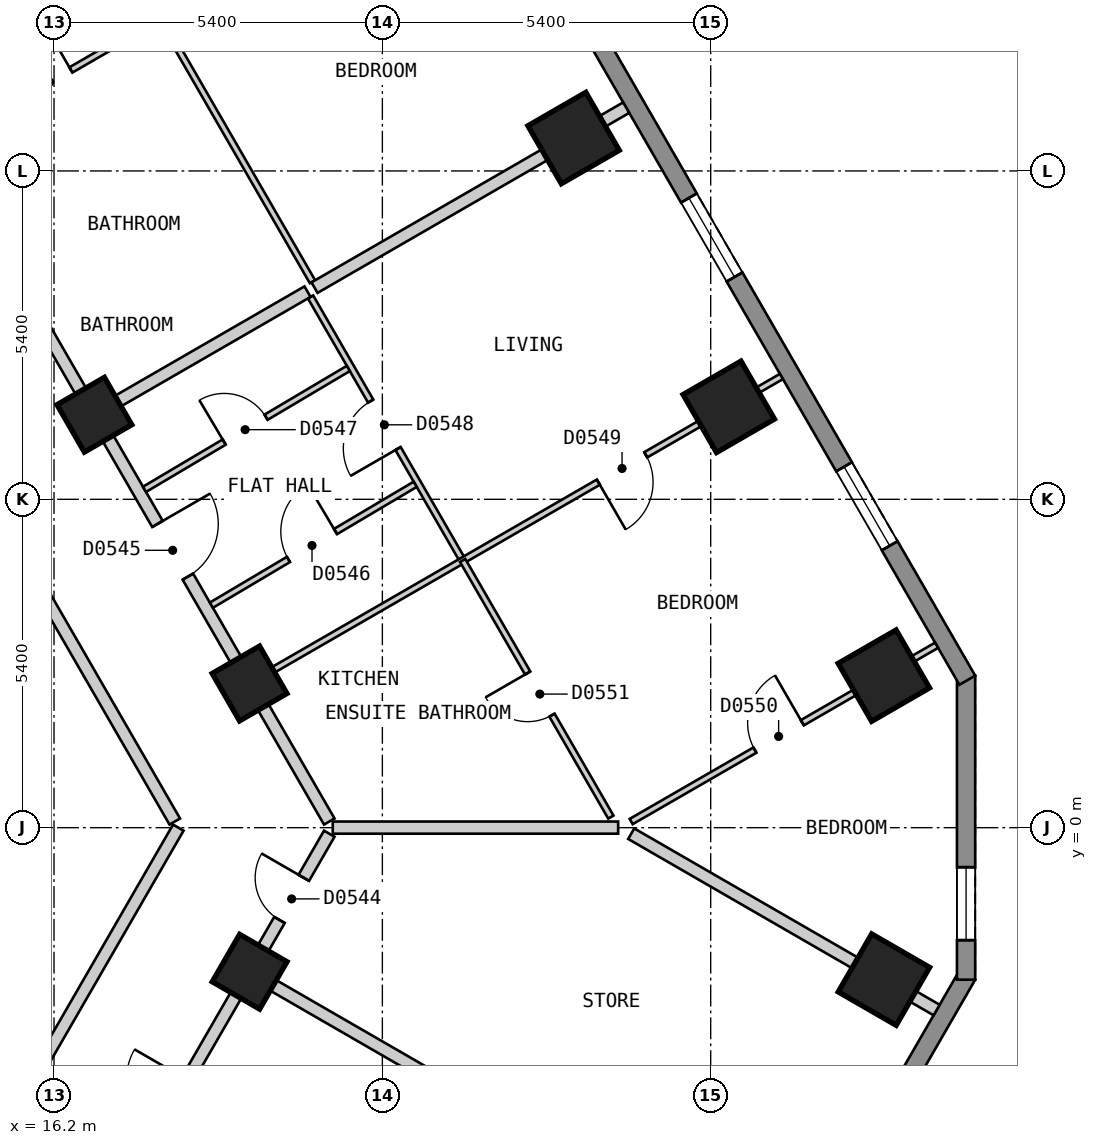
"""IFC4 building model, lengths in metres.
Left out: names, types, materials, properties, quantities, classifications, styles, units other than length and angle.
Written with IfcOpenShell. Run it as: python <this file> out.ifc"""

import sys

from ifc_helpers import new_model, si_unit, direction, frame, frame_2d, origin, origin_2d, place, context, subcontext, project, spatial, polyline, rectangle, outline, extrude, element, fill, save


model = new_model("IFC4")
c1 = context("Model", 3, precision=1e-05, world=origin(), true_north=direction((0.0, 1.0)))
c2 = subcontext(c1, "Body", "Model", "MODEL_VIEW")
j1 = project(units=[si_unit("LENGTHUNIT", "METRE"), si_unit("PLANEANGLEUNIT", "RADIAN")], contexts=[c1])
p1 = place(None, origin())
s1 = spatial("IfcSite", under=j1, at=p1, CompositionType="ELEMENT")
p2 = place(p1, origin())
s2 = spatial("IfcBuilding", under=s1, at=p2, CompositionType="ELEMENT")
p3 = place(p2, frame((0.0, 0.0, 56.4)))
s3 = spatial("IfcBuildingStorey", under=s2, at=p3, CompositionType="ELEMENT", Elevation=56.4)
for number, where, z_axis, x_axis in (
    (1, (29.849, -2.499, 0.0), (0.0, 0.0, 1.0), (0.5, 0.866, 0.0)),
    (2, (29.848, 2.5, 0.0), (0.0, 0.0, 1.0), (-0.5, 0.866, 0.0)),
    (3, (27.297, 6.921, 0.0), (0.0, 0.0, 1.0), (-0.5, 0.866, 0.0)),
    (4, (24.745, 11.341, 0.0), (0.0, 0.0, 1.0), (-0.5, 0.866, 0.0)),
):
    element("IfcColumn", number, at=place(p3, frame(where, z_axis=z_axis, x_axis=x_axis)), inside=s3, PredefinedType="COLUMN", context=c2, shape_type="SweptSolid", body=[
        extrude(rectangle(XDim=1.1, YDim=1.1, at=origin_2d()), origin(), (0.0, 0.0, 1.0), 3.0),
    ])
for number, where, z_axis, x_axis in (
    (5, (19.417, -2.369, 0.0), (0.0, 0.0, 1.0), (0.5, 0.866, 0.0)),
    (6, (19.416, 2.371, 0.0), (0.0, 0.0, 1.0), (-0.5, 0.866, 0.0)),
    (7, (16.864, 6.791, 0.0), (0.0, 0.0, 1.0), (-0.5, 0.866, 0.0)),
):
    element("IfcColumn", number, at=place(p3, frame(where, z_axis=z_axis, x_axis=x_axis)), inside=s3, PredefinedType="COLUMN", context=c2, shape_type="SweptSolid", body=[
        extrude(rectangle(XDim=0.9, YDim=0.9, at=origin_2d()), origin(), (0.0, 0.0, 1.0), 3.0),
    ])
p4 = place(p3, frame((17.71, -25.825, 0.0), z_axis=(0.0, 0.0, 1.0), x_axis=(0.500001938803, 0.866024284413, 0.0)))
e8 = element("IfcWall", 8, at=p4, inside=s3, PredefinedType="SOLIDWALL", context=c2, shape_type="SweptSolid", body=[
    extrude(outline(polyline([(0.0, -0.15), (27.02, -0.15), (26.94, 0.15), (0.08, 0.15), (0.0, -0.15)])), origin(), (0.0, 0.0, 1.0), 2.7),
])
p5 = place(p4, frame((2.553, 0.0, 0.15)))
e9 = element("IfcOpeningElement", 9, at=p5, cuts=e8, PredefinedType="OPENING", context=c2, shape_type="SweptSolid", body=[
    extrude(rectangle(XDim=1.5, YDim=2.1, at=frame_2d((0.75, 1.05))), frame((0.0, 0.16, 0.0), z_axis=(0.0, -1.0, 0.0), x_axis=(1.0, 0.0, 0.0)), (0.0, 0.0, 1.0), 0.32),
])
p6 = place(p4, frame((7.658, 0.0, 0.15)))
e10 = element("IfcOpeningElement", 10, at=p6, cuts=e8, PredefinedType="OPENING", context=c2, shape_type="SweptSolid", body=[
    extrude(rectangle(XDim=1.5, YDim=2.1, at=frame_2d((0.75, 1.05))), frame((0.0, 0.16, 0.0), z_axis=(0.0, -1.0, 0.0), x_axis=(1.0, 0.0, 0.0)), (0.0, 0.0, 1.0), 0.32),
])
p7 = place(p4, frame((12.761, 0.0, 0.15)))
e11 = element("IfcOpeningElement", 11, at=p7, cuts=e8, PredefinedType="OPENING", context=c2, shape_type="SweptSolid", body=[
    extrude(rectangle(XDim=1.5, YDim=2.1, at=frame_2d((0.75, 1.05))), frame((0.0, 0.16, 0.0), z_axis=(0.0, -1.0, 0.0), x_axis=(1.0, 0.0, 0.0)), (0.0, 0.0, 1.0), 0.32),
])
p8 = place(p4, frame((17.865, 0.0, 0.15)))
e12 = element("IfcOpeningElement", 12, at=p8, cuts=e8, PredefinedType="OPENING", context=c2, shape_type="SweptSolid", body=[
    extrude(rectangle(XDim=1.5, YDim=2.1, at=frame_2d((0.75, 1.05))), frame((0.0, 0.16, 0.0), z_axis=(0.0, -1.0, 0.0), x_axis=(1.0, 0.0, 0.0)), (0.0, 0.0, 1.0), 0.32),
])
p9 = place(p4, frame((22.969, 0.0, 0.15)))
e13 = element("IfcOpeningElement", 13, at=p9, cuts=e8, PredefinedType="OPENING", context=c2, shape_type="SweptSolid", body=[
    extrude(rectangle(XDim=1.5, YDim=2.1, at=frame_2d((0.75, 1.05))), frame((0.0, 0.16, 0.0), z_axis=(0.0, -1.0, 0.0), x_axis=(1.0, 0.0, 0.0)), (0.0, 0.0, 1.0), 0.32),
])
p10 = place(p3, frame((31.2, -2.5, 0.0), z_axis=(0.0, 0.0, 1.0), x_axis=(0.0, 1.0, 0.0)))
e14 = element("IfcWall", 14, at=p10, inside=s3, PredefinedType="SOLIDWALL", context=c2, shape_type="SweptSolid", body=[
    extrude(outline(polyline([(0.0, -0.15), (5.0, -0.15), (4.92, 0.15), (0.08, 0.15), (0.0, -0.15)])), origin(), (0.0, 0.0, 1.0), 2.7),
])
p11 = place(p10, frame((0.65, 0.0, 0.15)))
e15 = element("IfcOpeningElement", 15, at=p11, cuts=e14, PredefinedType="OPENING", context=c2, shape_type="SweptSolid", body=[
    extrude(rectangle(XDim=1.2, YDim=2.1, at=frame_2d((0.6, 1.05))), frame((0.0, 0.16, 0.0), z_axis=(0.0, -1.0, 0.0), x_axis=(1.0, 0.0, 0.0)), (0.0, 0.0, 1.0), 0.32),
])
p12 = place(p3, frame((31.22, 2.425, 0.0), z_axis=(0.0, 0.0, 1.0), x_axis=(-0.500001938803, 0.866024284413, 0.0)))
e16 = element("IfcWall", 16, at=p12, inside=s3, PredefinedType="SOLIDWALL", context=c2, shape_type="SweptSolid", body=[
    extrude(outline(polyline([(0.0, -0.15), (27.02, -0.15), (26.94, 0.15), (0.08, 0.15), (0.0, -0.15)])), origin(), (0.0, 0.0, 1.0), 2.7),
])
p13 = place(p12, frame((2.553, 0.0, 0.15)))
e17 = element("IfcOpeningElement", 17, at=p13, cuts=e16, PredefinedType="OPENING", context=c2, shape_type="SweptSolid", body=[
    extrude(rectangle(XDim=1.5, YDim=2.1, at=frame_2d((0.75, 1.05))), frame((0.0, 0.16, 0.0), z_axis=(0.0, -1.0, 0.0), x_axis=(1.0, 0.0, 0.0)), (0.0, 0.0, 1.0), 0.32),
])
p14 = place(p12, frame((7.657, 0.0, 0.15)))
e18 = element("IfcOpeningElement", 18, at=p14, cuts=e16, PredefinedType="OPENING", context=c2, shape_type="SweptSolid", body=[
    extrude(rectangle(XDim=1.5, YDim=2.1, at=frame_2d((0.75, 1.05))), frame((0.0, 0.16, 0.0), z_axis=(0.0, -1.0, 0.0), x_axis=(1.0, 0.0, 0.0)), (0.0, 0.0, 1.0), 0.32),
])
p15 = place(p12, frame((12.761, 0.0, 0.15)))
e19 = element("IfcOpeningElement", 19, at=p15, cuts=e16, PredefinedType="OPENING", context=c2, shape_type="SweptSolid", body=[
    extrude(rectangle(XDim=1.5, YDim=2.1, at=frame_2d((0.75, 1.05))), frame((0.0, 0.16, 0.0), z_axis=(0.0, -1.0, 0.0), x_axis=(1.0, 0.0, 0.0)), (0.0, 0.0, 1.0), 0.32),
])
p16 = place(p12, frame((17.865, 0.0, 0.15)))
e20 = element("IfcOpeningElement", 20, at=p16, cuts=e16, PredefinedType="OPENING", context=c2, shape_type="SweptSolid", body=[
    extrude(rectangle(XDim=1.5, YDim=2.1, at=frame_2d((0.75, 1.05))), frame((0.0, 0.16, 0.0), z_axis=(0.0, -1.0, 0.0), x_axis=(1.0, 0.0, 0.0)), (0.0, 0.0, 1.0), 0.32),
])
p17 = place(p12, frame((22.969, 0.0, 0.15)))
e21 = element("IfcOpeningElement", 21, at=p17, cuts=e16, PredefinedType="OPENING", context=c2, shape_type="SweptSolid", body=[
    extrude(rectangle(XDim=1.5, YDim=2.1, at=frame_2d((0.75, 1.05))), frame((0.0, 0.16, 0.0), z_axis=(0.0, -1.0, 0.0), x_axis=(1.0, 0.0, 0.0)), (0.0, 0.0, 1.0), 0.32),
])
p18 = place(p3, frame((9.18, 15.7, 0.0), z_axis=(0.0, 0.0, 1.0), x_axis=(0.500003652032, -0.866023295272, 0.0)))
e22 = element("IfcWall", 22, at=p18, inside=s3, PredefinedType="PARTITIONING", context=c2, shape_type="SweptSolid", body=[
    extrude(rectangle(XDim=18.012, YDim=0.2, at=frame_2d((9.006, 0.0))), origin(), (0.0, 0.0, 1.0), 2.7),
])
p19 = place(p18, frame((8.556, 0.0, 0.0)))
e23 = element("IfcOpeningElement", 23, at=p19, cuts=e22, PredefinedType="OPENING", context=c2, shape_type="SweptSolid", body=[
    extrude(rectangle(XDim=0.9, YDim=2.1, at=frame_2d((0.45, 1.05))), frame((0.0, 0.11, 0.0), z_axis=(0.0, -1.0, 0.0), x_axis=(1.0, 0.0, 0.0)), (0.0, 0.0, 1.0), 0.22),
])
p20 = place(p3, frame((10.45, 17.9, 0.0), z_axis=(0.0, 0.0, 1.0), x_axis=(0.500034352617, -0.866005569383, 0.0)))
e24 = element("IfcWall", 24, at=p20, inside=s3, PredefinedType="PARTITIONING", context=c2, shape_type="SweptSolid", body=[
    extrude(rectangle(XDim=20.553, YDim=0.2, at=frame_2d((10.276, 0.0))), origin(), (0.0, 0.0, 1.0), 2.7),
])
p21 = place(p20, frame((14.902, 0.0, 0.0)))
e25 = element("IfcOpeningElement", 25, at=p21, cuts=e24, PredefinedType="OPENING", context=c2, shape_type="SweptSolid", body=[
    extrude(rectangle(XDim=1.0, YDim=2.1, at=frame_2d((0.5, 1.05))), frame((0.0, 0.11, 0.0), z_axis=(0.0, -1.0, 0.0), x_axis=(1.0, 0.0, 0.0)), (0.0, 0.0, 1.0), 0.22),
])
p22 = place(p20, frame((4.671, 0.0, 0.0)))
e26 = element("IfcOpeningElement", 26, at=p22, cuts=e24, PredefinedType="OPENING", context=c2, shape_type="SweptSolid", body=[
    extrude(rectangle(XDim=1.0, YDim=2.1, at=frame_2d((0.5, 1.05))), frame((0.0, 0.11, 0.0), z_axis=(0.0, -1.0, 0.0), x_axis=(1.0, 0.0, 0.0)), (0.0, 0.0, 1.0), 0.22),
])
p23 = place(p3, frame((15.6, -4.579, 0.0), z_axis=(0.0, 0.0, 1.0), x_axis=(0.499927597274, 0.866067201483, 0.0)))
e27 = element("IfcWall", 27, at=p23, inside=s3, PredefinedType="PARTITIONING", context=c2, shape_type="SweptSolid", body=[
    extrude(rectangle(XDim=5.288, YDim=0.2, at=frame_2d((2.644, 0.0))), origin(), (0.0, 0.0, 1.0), 2.7),
])
p24 = place(p3, frame((15.707, -8.794, 0.0), z_axis=(0.0, 0.0, 1.0), x_axis=(0.50000451406, 0.866022797575, 0.0)))
e28 = element("IfcWall", 28, at=p24, inside=s3, PredefinedType="PARTITIONING", context=c2, shape_type="SweptSolid", body=[
    extrude(rectangle(XDim=10.04, YDim=0.2, at=frame_2d((5.02, 0.0))), origin(), (0.0, 0.0, 1.0), 2.7),
])
p25 = place(p24, frame((4.367, 0.0, 0.0)))
e29 = element("IfcOpeningElement", 29, at=p25, cuts=e28, PredefinedType="OPENING", context=c2, shape_type="SweptSolid", body=[
    extrude(rectangle(XDim=1.0, YDim=2.1, at=frame_2d((0.5, 1.05))), frame((0.0, 0.11, 0.0), z_axis=(0.0, -1.0, 0.0), x_axis=(1.0, 0.0, 0.0)), (0.0, 0.0, 1.0), 0.22),
])
p26 = place(p24, frame((8.402, 0.0, 0.0)))
e30 = element("IfcOpeningElement", 30, at=p26, cuts=e28, PredefinedType="OPENING", context=c2, shape_type="SweptSolid", body=[
    extrude(rectangle(XDim=0.8, YDim=2.1, at=frame_2d((0.4, 1.05))), frame((0.0, 0.11, 0.0), z_axis=(0.0, -1.0, 0.0), x_axis=(1.0, 0.0, 0.0)), (0.0, 0.0, 1.0), 0.22),
])
p27 = place(p3, frame((20.419, 8.728, 0.0), z_axis=(0.0, 0.0, 1.0), x_axis=(0.499958946799, -0.866049104564, 0.0)))
e31 = element("IfcWall", 31, at=p27, inside=s3, PredefinedType="PARTITIONING", context=c2, shape_type="SweptSolid", body=[
    extrude(rectangle(XDim=5.004, YDim=0.1, at=frame_2d((2.502, 0.0))), origin(), (0.0, 0.0, 1.0), 2.7),
])
p28 = place(p27, frame((1.978, 0.0, 0.0)))
e32 = element("IfcOpeningElement", 32, at=p28, cuts=e31, PredefinedType="OPENING", context=c2, shape_type="SweptSolid", body=[
    extrude(rectangle(XDim=0.9, YDim=2.1, at=frame_2d((0.45, 1.05))), frame((0.0, 0.06, 0.0), z_axis=(0.0, -1.0, 0.0), x_axis=(1.0, 0.0, 0.0)), (0.0, 0.0, 1.0), 0.12),
])
p29 = place(p3, frame((12.875, 22.1, 0.0), z_axis=(0.0, 0.0, 1.0), x_axis=(0.499994897061, -0.866028349948, 0.0)))
e33 = element("IfcWall", 33, at=p29, inside=s3, PredefinedType="PARTITIONING", context=c2, shape_type="SweptSolid", body=[
    extrude(rectangle(XDim=15.152, YDim=0.1, at=frame_2d((7.576, 0.0))), origin(), (0.0, 0.0, 1.0), 2.7),
])
p30 = place(p29, frame((7.146, 0.0, 0.0)))
e34 = element("IfcOpeningElement", 34, at=p30, cuts=e33, PredefinedType="OPENING", context=c2, shape_type="SweptSolid", body=[
    extrude(rectangle(XDim=0.9, YDim=2.1, at=frame_2d((0.45, 1.05))), frame((0.0, 0.06, 0.0), z_axis=(0.0, -1.0, 0.0), x_axis=(1.0, 0.0, 0.0)), (0.0, 0.0, 1.0), 0.12),
])
p31 = place(p3, frame((19.503, 2.421, 0.0), z_axis=(0.0, 0.0, 1.0), x_axis=(0.866065245018, 0.499930986609, 0.0)))
e35 = element("IfcWall", 35, at=p31, inside=s3, PredefinedType="PARTITIONING", context=c2, shape_type="SweptSolid", body=[
    extrude(rectangle(XDim=10.0, YDim=0.1, at=frame_2d((5.0, 0.0))), origin(), (0.0, 0.0, 1.0), 2.7),
])
p32 = place(p31, frame((6.523, 0.0, 0.0)))
e36 = element("IfcOpeningElement", 36, at=p32, cuts=e35, PredefinedType="OPENING", context=c2, shape_type="SweptSolid", body=[
    extrude(rectangle(XDim=0.9, YDim=2.1, at=frame_2d((0.45, 1.05))), frame((0.0, 0.06, 0.0), z_axis=(0.0, -1.0, 0.0), x_axis=(1.0, 0.0, 0.0)), (0.0, 0.0, 1.0), 0.12),
])
p33 = place(p3, frame((25.692, 0.101, 0.0), z_axis=(0.0, 0.0, 1.0), x_axis=(0.866116197112, 0.49984270836, 0.0)))
e37 = element("IfcWall", 37, at=p33, inside=s3, PredefinedType="PARTITIONING", context=c2, shape_type="SweptSolid", body=[
    extrude(rectangle(XDim=5.8, YDim=0.1, at=frame_2d((2.9, 0.0))), origin(), (0.0, 0.0, 1.0), 2.7),
])
p34 = place(p33, frame((2.35, 0.0, 0.0)))
e38 = element("IfcOpeningElement", 38, at=p34, cuts=e37, PredefinedType="OPENING", context=c2, shape_type="SweptSolid", body=[
    extrude(rectangle(XDim=0.9, YDim=2.1, at=frame_2d((0.45, 1.05))), frame((0.0, 0.06, 0.0), z_axis=(0.0, -1.0, 0.0), x_axis=(1.0, 0.0, 0.0)), (0.0, 0.0, 1.0), 0.12),
])
p35 = place(p3, frame((14.399, 11.261, 0.0), z_axis=(0.0, 0.0, 1.0), x_axis=(0.865980278416, 0.500078151287, 0.0)))
e39 = element("IfcWall", 39, at=p35, inside=s3, PredefinedType="PARTITIONING", context=c2, shape_type="SweptSolid", body=[
    extrude(rectangle(XDim=4.099, YDim=0.1, at=frame_2d((2.05, 0.0))), origin(), (0.0, 0.0, 1.0), 2.7),
])
p36 = place(p35, frame((1.6, 0.0, 0.0)))
e40 = element("IfcOpeningElement", 40, at=p36, cuts=e39, PredefinedType="OPENING", context=c2, shape_type="SweptSolid", body=[
    extrude(rectangle(XDim=0.8, YDim=2.1, at=frame_2d((0.4, 1.05))), frame((0.0, 0.06, 0.0), z_axis=(0.0, -1.0, 0.0), x_axis=(1.0, 0.0, 0.0)), (0.0, 0.0, 1.0), 0.12),
])
p37 = place(p3, frame((17.688, 5.564, 0.0), z_axis=(0.0, 0.0, 1.0), x_axis=(0.860107296662, 0.510113162179, 0.0)))
e41 = element("IfcWall", 41, at=p37, inside=s3, PredefinedType="PARTITIONING", context=c2, shape_type="SweptSolid", body=[
    extrude(rectangle(XDim=3.897, YDim=0.1, at=frame_2d((1.949, 0.0))), origin(), (0.0, 0.0, 1.0), 2.7),
])
p38 = place(p37, frame((1.524, 0.0, 0.0)))
e42 = element("IfcOpeningElement", 42, at=p38, cuts=e41, PredefinedType="OPENING", context=c2, shape_type="SweptSolid", body=[
    extrude(rectangle(XDim=0.8, YDim=2.1, at=frame_2d((0.4, 1.05))), frame((0.0, 0.06, 0.0), z_axis=(0.0, -1.0, 0.0), x_axis=(1.0, 0.0, 0.0)), (0.0, 0.0, 1.0), 0.12),
])
p39 = place(p3, frame((18.788, 3.659, 0.0), z_axis=(0.0, 0.0, 1.0), x_axis=(0.860090994311, 0.510140648749, 0.0)))
e43 = element("IfcWall", 43, at=p39, inside=s3, PredefinedType="PARTITIONING", context=c2, shape_type="SweptSolid", body=[
    extrude(rectangle(XDim=3.897, YDim=0.1, at=frame_2d((1.948, 0.0))), origin(), (0.0, 0.0, 1.0), 2.7),
])
p40 = place(p39, frame((1.474, 0.0, 0.0)))
e44 = element("IfcOpeningElement", 44, at=p40, cuts=e43, PredefinedType="OPENING", context=c2, shape_type="SweptSolid", body=[
    extrude(rectangle(XDim=0.9, YDim=2.1, at=frame_2d((0.45, 1.05))), frame((0.0, 0.06, 0.0), z_axis=(0.0, -1.0, 0.0), x_axis=(1.0, 0.0, 0.0)), (0.0, 0.0, 1.0), 0.12),
])
p41 = place(p3, frame((19.503, -2.419, 0.0), z_axis=(0.0, 0.0, 1.0), x_axis=(0.866022959057, -0.500004234368, 0.0)))
e45 = element("IfcWall", 45, at=p41, inside=s3, PredefinedType="PARTITIONING", context=c2, shape_type="SweptSolid", body=[
    extrude(rectangle(XDim=10.0, YDim=0.2, at=frame_2d((5.0, 0.0))), origin(), (0.0, 0.0, 1.0), 2.7),
])
p42 = place(p3, frame((25.693, -0.099, 0.0), z_axis=(0.0, 0.0, 1.0), x_axis=(0.866032775405, -0.499987231761, 0.0)))
e46 = element("IfcWall", 46, at=p42, inside=s3, PredefinedType="PARTITIONING", context=c2, shape_type="SweptSolid", body=[
    extrude(rectangle(XDim=5.8, YDim=0.2, at=frame_2d((2.9, 0.0))), origin(), (0.0, 0.0, 1.0), 2.7),
])
p43 = place(p3, frame((20.784, 0.001, 0.0), z_axis=(0.0, 0.0, 1.0), x_axis=(1.0, 0.0, 0.0)))
e47 = element("IfcWall", 47, at=p43, inside=s3, PredefinedType="PARTITIONING", context=c2, shape_type="SweptSolid", body=[
    extrude(rectangle(XDim=4.694, YDim=0.2, at=frame_2d((2.347, 0.0))), origin(), (0.0, 0.0, 1.0), 2.7),
])
p44 = place(p3, frame((16.95, 6.841, 0.0), z_axis=(0.0, 0.0, 1.0), x_axis=(0.866031112038, 0.499990112884, 0.0)))
e48 = element("IfcWall", 48, at=p44, inside=s3, PredefinedType="PARTITIONING", context=c2, shape_type="SweptSolid", body=[
    extrude(rectangle(XDim=3.948, YDim=0.2, at=frame_2d((1.974, 0.0))), origin(), (0.0, 0.0, 1.0), 2.7),
])
p45 = place(p3, frame((20.484, 8.881, 0.0), z_axis=(0.0, 0.0, 1.0), x_axis=(0.866000821391, 0.500042575537, 0.0)))
e49 = element("IfcWall", 49, at=p45, inside=s3, PredefinedType="PARTITIONING", context=c2, shape_type="SweptSolid", body=[
    extrude(rectangle(XDim=5.919, YDim=0.2, at=frame_2d((2.96, 0.0))), origin(), (0.0, 0.0, 1.0), 2.7),
])
p46 = place(p3, frame((22.921, 4.394, 0.0), z_axis=(0.0, 0.0, 1.0), x_axis=(0.500093956194, -0.865971151354, 0.0)))
e50 = element("IfcWall", 50, at=p46, inside=s3, PredefinedType="PARTITIONING", context=c2, shape_type="SweptSolid", body=[
    extrude(rectangle(XDim=4.873, YDim=0.1, at=frame_2d((2.437, 0.0))), origin(), (0.0, 0.0, 1.0), 2.7),
])
p47 = place(p46, frame((2.137, 0.0, 0.0)))
e51 = element("IfcOpeningElement", 51, at=p47, cuts=e50, PredefinedType="OPENING", context=c2, shape_type="SweptSolid", body=[
    extrude(rectangle(XDim=0.8, YDim=2.1, at=frame_2d((0.4, 1.05))), frame((0.0, 0.06, 0.0), z_axis=(0.0, -1.0, 0.0), x_axis=(1.0, 0.0, 0.0)), (0.0, 0.0, 1.0), 0.12),
])
p48 = place(p11, origin())
e52 = element("IfcWindow", 52, at=p48, inside=s3, PartitioningType="SINGLE_PANEL", PredefinedType="WINDOW", context=c2, shape_type="SweptSolid", body=[
    extrude(rectangle(XDim=1.2, YDim=2.1, at=frame_2d((0.6, 1.05))), frame((0.0, 0.03, 0.0), z_axis=(0.0, -1.0, 0.0), x_axis=(1.0, 0.0, 0.0)), (0.0, 0.0, 1.0), 0.06),
])
fill(e15, e52)
p49 = place(p13, origin())
e53 = element("IfcWindow", 53, at=p49, inside=s3, PartitioningType="SINGLE_PANEL", PredefinedType="WINDOW", context=c2, shape_type="SweptSolid", body=[
    extrude(rectangle(XDim=1.5, YDim=2.1, at=frame_2d((0.75, 1.05))), frame((0.0, 0.03, 0.0), z_axis=(0.0, -1.0, 0.0), x_axis=(1.0, 0.0, 0.0)), (0.0, 0.0, 1.0), 0.06),
])
fill(e17, e53)
p50 = place(p14, origin())
e54 = element("IfcWindow", 54, at=p50, inside=s3, PartitioningType="SINGLE_PANEL", PredefinedType="WINDOW", context=c2, shape_type="SweptSolid", body=[
    extrude(rectangle(XDim=1.5, YDim=2.1, at=frame_2d((0.75, 1.05))), frame((0.0, 0.03, 0.0), z_axis=(0.0, -1.0, 0.0), x_axis=(1.0, 0.0, 0.0)), (0.0, 0.0, 1.0), 0.06),
])
fill(e18, e54)
p51 = place(p26, origin())
e55 = element("IfcDoor", 55, at=p51, inside=s3, OperationType="SINGLE_SWING_RIGHT", PredefinedType="DOOR", context=c2, shape_type="SweptSolid", body=[
    extrude(rectangle(XDim=0.8, YDim=2.1, at=frame_2d((0.4, 1.05))), frame((0.0, 0.025, 0.0), z_axis=(0.0, -1.0, 0.0), x_axis=(1.0, 0.0, 0.0)), (0.0, 0.0, 1.0), 0.05),
])
fill(e30, e55)
p52 = place(p21, origin())
e56 = element("IfcDoor", 56, at=p52, inside=s3, OperationType="SINGLE_SWING_LEFT", PredefinedType="DOOR", context=c2, shape_type="SweptSolid", body=[
    extrude(rectangle(XDim=1.0, YDim=2.1, at=frame_2d((0.5, 1.05))), frame((0.0, 0.025, 0.0), z_axis=(0.0, -1.0, 0.0), x_axis=(1.0, 0.0, 0.0)), (0.0, 0.0, 1.0), 0.05),
])
fill(e25, e56)
p53 = place(p40, origin())
e57 = element("IfcDoor", 57, at=p53, inside=s3, OperationType="SINGLE_SWING_RIGHT", PredefinedType="DOOR", context=c2, shape_type="SweptSolid", body=[
    extrude(rectangle(XDim=0.9, YDim=2.1, at=frame_2d((0.45, 1.05))), frame((0.0, 0.025, 0.0), z_axis=(0.0, -1.0, 0.0), x_axis=(1.0, 0.0, 0.0)), (0.0, 0.0, 1.0), 0.05),
])
fill(e44, e57)
p54 = place(p38, origin())
e58 = element("IfcDoor", 58, at=p54, inside=s3, OperationType="SINGLE_SWING_LEFT", PredefinedType="DOOR", context=c2, shape_type="SweptSolid", body=[
    extrude(rectangle(XDim=0.8, YDim=2.1, at=frame_2d((0.4, 1.05))), frame((0.0, 0.025, 0.0), z_axis=(0.0, -1.0, 0.0), x_axis=(1.0, 0.0, 0.0)), (0.0, 0.0, 1.0), 0.05),
])
fill(e42, e58)
p55 = place(p28, origin())
e59 = element("IfcDoor", 59, at=p55, inside=s3, OperationType="SINGLE_SWING_RIGHT", PredefinedType="DOOR", context=c2, shape_type="SweptSolid", body=[
    extrude(rectangle(XDim=0.9, YDim=2.1, at=frame_2d((0.45, 1.05))), frame((0.0, 0.025, 0.0), z_axis=(0.0, -1.0, 0.0), x_axis=(1.0, 0.0, 0.0)), (0.0, 0.0, 1.0), 0.05),
])
fill(e32, e59)
p56 = place(p32, origin())
e60 = element("IfcDoor", 60, at=p56, inside=s3, OperationType="SINGLE_SWING_LEFT", PredefinedType="DOOR", context=c2, shape_type="SweptSolid", body=[
    extrude(rectangle(XDim=0.9, YDim=2.1, at=frame_2d((0.45, 1.05))), frame((0.0, 0.025, 0.0), z_axis=(0.0, -1.0, 0.0), x_axis=(1.0, 0.0, 0.0)), (0.0, 0.0, 1.0), 0.05),
])
fill(e36, e60)
p57 = place(p34, origin())
e61 = element("IfcDoor", 61, at=p57, inside=s3, OperationType="SINGLE_SWING_RIGHT", PredefinedType="DOOR", context=c2, shape_type="SweptSolid", body=[
    extrude(rectangle(XDim=0.9, YDim=2.1, at=frame_2d((0.45, 1.05))), frame((0.0, 0.025, 0.0), z_axis=(0.0, -1.0, 0.0), x_axis=(1.0, 0.0, 0.0)), (0.0, 0.0, 1.0), 0.05),
])
fill(e38, e61)
p58 = place(p47, origin())
e62 = element("IfcDoor", 62, at=p58, inside=s3, OperationType="SINGLE_SWING_LEFT", PredefinedType="DOOR", context=c2, shape_type="SweptSolid", body=[
    extrude(rectangle(XDim=0.8, YDim=2.1, at=frame_2d((0.4, 1.05))), frame((0.0, 0.025, 0.0), z_axis=(0.0, -1.0, 0.0), x_axis=(1.0, 0.0, 0.0)), (0.0, 0.0, 1.0), 0.05),
])
fill(e51, e62)
p59 = place(p36, origin())
e63 = element("IfcDoor", 63, at=p59, inside=s3, OperationType="SINGLE_SWING_RIGHT", PredefinedType="DOOR", context=c2, shape_type="SweptSolid", body=[
    extrude(rectangle(XDim=0.8, YDim=2.1, at=frame_2d((0.4, 1.05))), frame((0.0, 0.025, 0.0), z_axis=(0.0, -1.0, 0.0), x_axis=(1.0, 0.0, 0.0)), (0.0, 0.0, 1.0), 0.05),
])
fill(e40, e63)
save(model, sys.argv[1])
